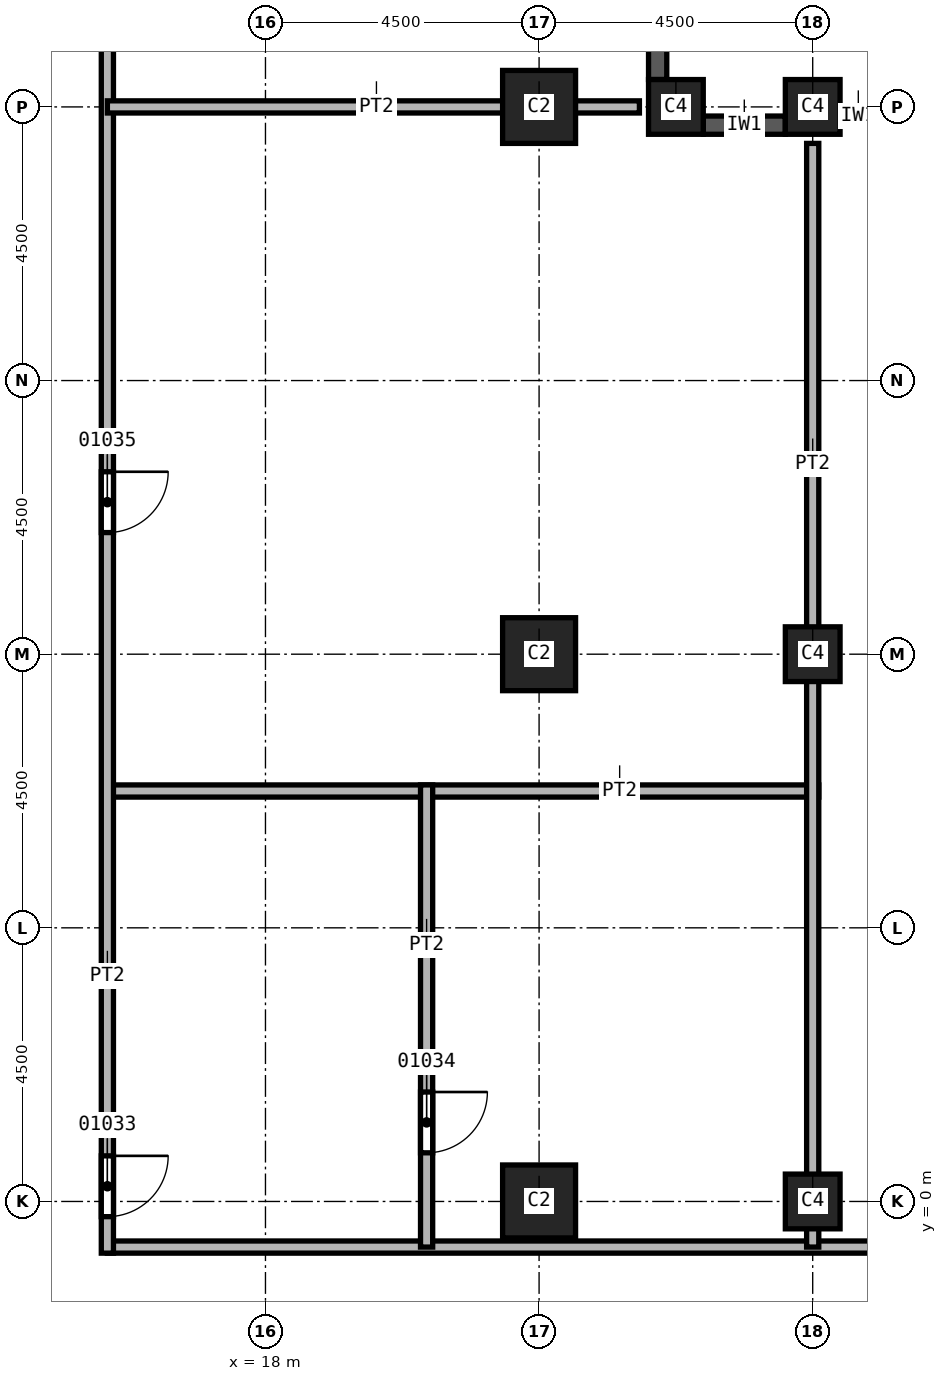
"""IFC4 building model, lengths in metres.
Left out: names, types, materials, properties, quantities, classifications, styles, units other than length and angle.
Written with IfcOpenShell. Run it as: python <this file> out.ifc"""

import sys

from ifc_helpers import new_model, si_unit, direction, frame, frame_2d, origin, origin_2d, place, context, subcontext, project, spatial, rectangle, extrude, element, fill, save


model = new_model("IFC4")
c1 = context("Model", 3, precision=1e-05, world=origin(), true_north=direction((0.0, 1.0)))
c2 = subcontext(c1, "Body", "Model", "MODEL_VIEW")
j1 = project(units=[si_unit("LENGTHUNIT", "METRE"), si_unit("PLANEANGLEUNIT", "RADIAN")], contexts=[c1])
p1 = place(None, origin())
s1 = spatial("IfcSite", under=j1, at=p1, CompositionType="ELEMENT")
p2 = place(p1, origin())
s2 = spatial("IfcBuilding", under=s1, at=p2, CompositionType="ELEMENT")
p3 = place(p2, frame((0.0, 0.0, 68.0)))
s3 = spatial("IfcBuildingStorey", under=s2, at=p3, CompositionType="ELEMENT", Elevation=68.0)
for number, where, z_axis, x_axis in (
    (1, (22.5, 0.0, 0.0), (0.0, 0.0, 1.0), (1.0, 0.0, 0.0)),
    (2, (22.5, 9.0, 0.0), (0.0, 0.0, 1.0), (1.0, 0.0, 0.0)),
    (3, (22.5, 18.0, 0.0), (0.0, 0.0, 1.0), (1.0, 0.0, 0.0)),
):
    element("IfcColumn", number, at=place(p3, frame(where, z_axis=z_axis, x_axis=x_axis)), inside=s3, PredefinedType="COLUMN", context=c2, shape_type="SweptSolid", body=[
        extrude(rectangle(XDim=1.2, YDim=1.2, at=origin_2d()), origin(), (0.0, 0.0, 1.0), 3.7),
    ])
for number, where, z_axis, x_axis in (
    (4, (27.0, 0.0, 0.0), (0.0, 0.0, 1.0), (1.0, 0.0, 0.0)),
    (5, (27.0, 9.0, 0.0), (0.0, 0.0, 1.0), (1.0, 0.0, 0.0)),
    (6, (27.0, 18.0, 0.0), (0.0, 0.0, 1.0), (1.0, 0.0, 0.0)),
    (7, (24.75, 18.0, 0.0), (0.0, 0.0, 1.0), (1.0, 0.0, 0.0)),
):
    element("IfcColumn", number, at=place(p3, frame(where, z_axis=z_axis, x_axis=x_axis)), inside=s3, PredefinedType="COLUMN", context=c2, shape_type="SweptSolid", body=[
        extrude(rectangle(XDim=0.9, YDim=0.9, at=origin_2d()), origin(), (0.0, 0.0, 1.0), 3.7),
    ])
p4 = place(p3, frame((31.05, 17.85, 0.0), z_axis=(0.0, 0.0, 1.0), x_axis=(-1.0, 0.0, 0.0)))
e8 = element("IfcWall", 8, at=p4, inside=s3, PredefinedType="SOLIDWALL", context=c2, shape_type="SweptSolid", body=[
    extrude(rectangle(XDim=3.6, YDim=0.3, at=frame_2d((1.8, 0.0))), origin(), (0.0, 0.0, 1.0), 3.1),
])
p5 = place(p4, frame((0.6, 0.0, 0.8)))
e9 = element("IfcOpeningElement", 9, at=p5, cuts=e8, PredefinedType="OPENING", context=c2, shape_type="SweptSolid", body=[
    extrude(rectangle(XDim=2.4, YDim=1.95, at=frame_2d((1.2, 0.975))), frame((0.0, 0.15, 0.0), z_axis=(0.0, -1.0, 0.0), x_axis=(1.0, 0.0, 0.0)), (0.0, 0.0, 1.0), 0.3),
])
p6 = place(p3, frame((26.55, 17.7, 0.0), z_axis=(0.0, 0.0, 1.0), x_axis=(-1.0, 0.0, 0.0)))
e10 = element("IfcWall", 10, at=p6, inside=s3, PredefinedType="SOLIDWALL", context=c2, shape_type="SweptSolid", body=[
    extrude(rectangle(XDim=1.35, YDim=0.3, at=frame_2d((0.675, 0.0))), origin(), (0.0, 0.0, 1.0), 3.1),
])
p7 = place(p3, frame((24.45, 18.45, 0.0), z_axis=(0.0, 0.0, 1.0), x_axis=(0.0, 1.0, 0.0)))
e11 = element("IfcWall", 11, at=p7, inside=s3, PredefinedType="SOLIDWALL", context=c2, shape_type="SweptSolid", body=[
    extrude(rectangle(XDim=2.5, YDim=0.3, at=frame_2d((1.25, 0.0))), origin(), (0.0, 0.0, 1.0), 3.1),
])
p8 = place(p3, frame((15.4, -0.75, 0.0), z_axis=(0.0, 0.0, 1.0), x_axis=(1.0, 0.0, 0.0)))
e12 = element("IfcWall", 12, at=p8, inside=s3, PredefinedType="PARTITIONING", context=c2, shape_type="SweptSolid", body=[
    extrude(rectangle(XDim=18.45, YDim=0.2, at=frame_2d((9.225, 0.0))), origin(), (0.0, 0.0, 1.0), 3.7),
])
p9 = place(p3, frame((15.4, 6.75, 0.0), z_axis=(0.0, 0.0, 1.0), x_axis=(1.0, 0.0, 0.0)))
e13 = element("IfcWall", 13, at=p9, inside=s3, PredefinedType="PARTITIONING", context=c2, shape_type="SweptSolid", body=[
    extrude(rectangle(XDim=11.7, YDim=0.2, at=frame_2d((5.85, 0.0))), origin(), (0.0, 0.0, 1.0), 3.7),
])
p10 = place(p3, frame((15.4, 24.5, 0.0), z_axis=(0.0, 0.0, 1.0), x_axis=(0.0, -1.0, 0.0)))
e14 = element("IfcWall", 14, at=p10, inside=s3, PredefinedType="PARTITIONING", context=c2, shape_type="SweptSolid", body=[
    extrude(rectangle(XDim=25.35, YDim=0.2, at=frame_2d((12.675, 0.0))), origin(), (0.0, 0.0, 1.0), 3.7),
])
p11 = place(p10, frame((23.75, 0.0, 0.0)))
e15 = element("IfcOpeningElement", 15, at=p11, cuts=e14, PredefinedType="OPENING", context=c2, shape_type="SweptSolid", body=[
    extrude(rectangle(XDim=1.0, YDim=2.1, at=frame_2d((0.5, 1.05))), frame((0.0, 0.1, 0.0), z_axis=(0.0, -1.0, 0.0), x_axis=(1.0, 0.0, 0.0)), (0.0, 0.0, 1.0), 0.2),
])
p12 = place(p10, frame((12.5, 0.0, 0.0)))
e16 = element("IfcOpeningElement", 16, at=p12, cuts=e14, PredefinedType="OPENING", context=c2, shape_type="SweptSolid", body=[
    extrude(rectangle(XDim=1.0, YDim=2.1, at=frame_2d((0.5, 1.05))), frame((0.0, 0.1, 0.0), z_axis=(0.0, -1.0, 0.0), x_axis=(1.0, 0.0, 0.0)), (0.0, 0.0, 1.0), 0.2),
])
p13 = place(p10, frame((2.8, 0.0, 0.0)))
e17 = element("IfcOpeningElement", 17, at=p13, cuts=e14, PredefinedType="OPENING", context=c2, shape_type="SweptSolid", body=[
    extrude(rectangle(XDim=1.0, YDim=2.1, at=frame_2d((0.5, 1.05))), frame((0.0, 0.1, 0.0), z_axis=(0.0, -1.0, 0.0), x_axis=(1.0, 0.0, 0.0)), (0.0, 0.0, 1.0), 0.2),
])
p14 = place(p3, frame((15.4, 18.0, 0.0), z_axis=(0.0, 0.0, 1.0), x_axis=(1.0, 0.0, 0.0)))
e18 = element("IfcWall", 18, at=p14, inside=s3, PredefinedType="PARTITIONING", context=c2, shape_type="SweptSolid", body=[
    extrude(rectangle(XDim=8.75, YDim=0.2, at=frame_2d((4.375, 0.0))), origin(), (0.0, 0.0, 1.0), 3.7),
])
p15 = place(p3, frame((20.65, 6.85, 0.0), z_axis=(0.0, 0.0, 1.0), x_axis=(0.0, -1.0, 0.0)))
e19 = element("IfcWall", 19, at=p15, inside=s3, PredefinedType="PARTITIONING", context=c2, shape_type="SweptSolid", body=[
    extrude(rectangle(XDim=7.6, YDim=0.2, at=frame_2d((3.8, 0.0))), origin(), (0.0, 0.0, 1.0), 3.7),
])
p16 = place(p15, frame((5.05, 0.0, 0.0)))
e20 = element("IfcOpeningElement", 20, at=p16, cuts=e19, PredefinedType="OPENING", context=c2, shape_type="SweptSolid", body=[
    extrude(rectangle(XDim=1.0, YDim=2.1, at=frame_2d((0.5, 1.05))), frame((0.0, 0.1, 0.0), z_axis=(0.0, -1.0, 0.0), x_axis=(1.0, 0.0, 0.0)), (0.0, 0.0, 1.0), 0.2),
])
p17 = place(p3, frame((27.0, 17.4, 0.0), z_axis=(0.0, 0.0, 1.0), x_axis=(0.0, -1.0, 0.0)))
e21 = element("IfcWall", 21, at=p17, inside=s3, PredefinedType="PARTITIONING", context=c2, shape_type="SweptSolid", body=[
    extrude(rectangle(XDim=18.15, YDim=0.2, at=frame_2d((9.075, 0.0))), origin(), (0.0, 0.0, 1.0), 3.7),
])
p18 = place(p11, origin())
e22 = element("IfcDoor", 22, at=p18, inside=s3, OperationType="SINGLE_SWING_RIGHT", PredefinedType="DOOR", context=c2, shape_type="SweptSolid", body=[
    extrude(rectangle(XDim=1.0, YDim=2.1, at=frame_2d((0.5, 1.05))), frame((0.0, 0.025, 0.0), z_axis=(0.0, -1.0, 0.0), x_axis=(1.0, 0.0, 0.0)), (0.0, 0.0, 1.0), 0.05),
])
fill(e15, e22)
p19 = place(p16, origin())
e23 = element("IfcDoor", 23, at=p19, inside=s3, OperationType="SINGLE_SWING_LEFT", PredefinedType="DOOR", context=c2, shape_type="SweptSolid", body=[
    extrude(rectangle(XDim=1.0, YDim=2.1, at=frame_2d((0.5, 1.05))), frame((0.0, 0.025, 0.0), z_axis=(0.0, -1.0, 0.0), x_axis=(1.0, 0.0, 0.0)), (0.0, 0.0, 1.0), 0.05),
])
fill(e20, e23)
p20 = place(p12, origin())
e24 = element("IfcDoor", 24, at=p20, inside=s3, OperationType="SINGLE_SWING_RIGHT", PredefinedType="DOOR", context=c2, shape_type="SweptSolid", body=[
    extrude(rectangle(XDim=1.0, YDim=2.1, at=frame_2d((0.5, 1.05))), frame((0.0, 0.025, 0.0), z_axis=(0.0, -1.0, 0.0), x_axis=(1.0, 0.0, 0.0)), (0.0, 0.0, 1.0), 0.05),
])
fill(e16, e24)
save(model, sys.argv[1])
